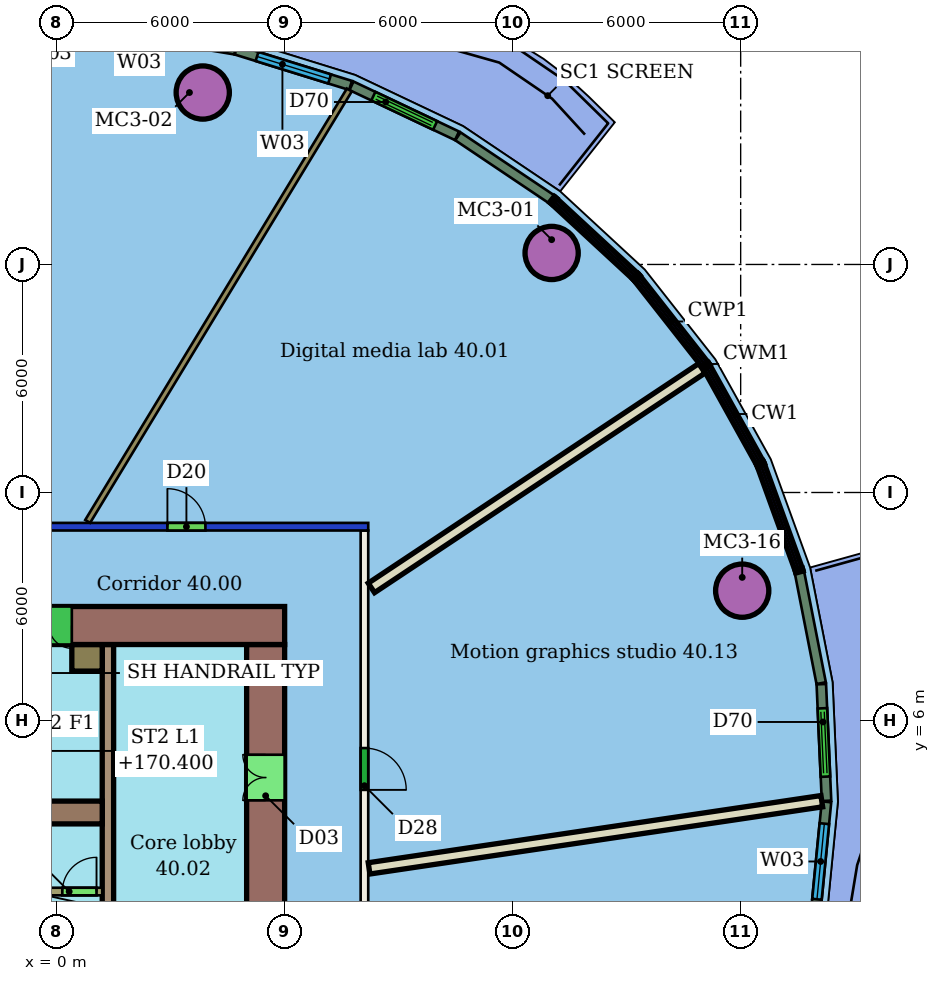
"""IFC4 building model, lengths in metres.
Left out: names, types, materials, properties, quantities, classifications, styles, units other than length and angle.
Written with IfcOpenShell. Run it as: python <this file> out.ifc"""

import sys

from ifc_helpers import new_model, si_unit, direction, frame, frame_2d, origin, origin_2d, place, context, subcontext, project, spatial, rectangle, hollow_circle, extrude, element, fill, save


model = new_model("IFC4")
c1 = context("Model", 3, precision=1e-05, world=origin(), true_north=direction((0.0, 1.0)))
c2 = subcontext(c1, "Body", "Model", "MODEL_VIEW")
j1 = project(units=[si_unit("LENGTHUNIT", "METRE"), si_unit("PLANEANGLEUNIT", "RADIAN")], contexts=[c1])
p1 = place(None, origin())
s1 = spatial("IfcSite", under=j1, at=p1, CompositionType="ELEMENT")
p2 = place(p1, origin())
s2 = spatial("IfcBuilding", under=s1, at=p2, CompositionType="ELEMENT")
p3 = place(p2, frame((0.0, 0.0, 168.6)))
s3 = spatial("IfcBuildingStorey", under=s2, at=p3, CompositionType="ELEMENT", Elevation=168.6)
for number, where, z_axis, x_axis in (
    (1, (13.026, 18.303, 0.0), (0.0, 0.0, 1.0), (1.0, 0.0, 0.0)),
    (2, (3.845, 22.524, 0.0), (0.0, 0.0, 1.0), (1.0, 0.0, 0.0)),
    (3, (18.041, 9.417, 0.0), (0.0, 0.0, 1.0), (1.0, 0.0, 0.0)),
):
    element("IfcColumn", number, at=place(p3, frame(where, z_axis=z_axis, x_axis=x_axis)), inside=s3, PredefinedType="COLUMN", context=c2, shape_type="SweptSolid", body=[
        extrude(hollow_circle(Radius=0.7, WallThickness=0.05, at=origin_2d()), origin(), (0.0, 0.0, 1.0), 3.45),
    ])
p4 = place(p3, frame((-20.2, 11.1, 0.0), z_axis=(0.0, 0.0, 1.0), x_axis=(1.0, 0.0, 0.0)))
e4 = element("IfcWall", 4, at=p4, inside=s3, PredefinedType="PARTITIONING", context=c2, shape_type="SweptSolid", body=[
    extrude(rectangle(XDim=28.4, YDim=0.2, at=frame_2d((14.2, 0.0))), origin(), (0.0, 0.0, 1.0), 3.05),
])
p5 = place(p4, frame((23.115, 0.0, 0.0)))
e5 = element("IfcOpeningElement", 5, at=p5, cuts=e4, PredefinedType="OPENING", context=c2, shape_type="SweptSolid", body=[
    extrude(rectangle(XDim=1.0, YDim=2.1, at=frame_2d((0.5, 1.05))), frame((0.0, 0.11, 0.0), z_axis=(0.0, -1.0, 0.0), x_axis=(1.0, 0.0, 0.0)), (0.0, 0.0, 1.0), 0.22),
])
p6 = place(p4, frame((16.0, 0.0, 0.0)))
e6 = element("IfcOpeningElement", 6, at=p6, cuts=e4, PredefinedType="OPENING", context=c2, shape_type="SweptSolid", body=[
    extrude(rectangle(XDim=1.8, YDim=2.1, at=frame_2d((0.9, 1.05))), frame((0.0, 0.11, 0.0), z_axis=(0.0, -1.0, 0.0), x_axis=(1.0, 0.0, 0.0)), (0.0, 0.0, 1.0), 0.22),
])
p7 = place(p4, frame((5.581, 0.0, 0.0)))
e7 = element("IfcOpeningElement", 7, at=p7, cuts=e4, PredefinedType="OPENING", context=c2, shape_type="SweptSolid", body=[
    extrude(rectangle(XDim=0.9, YDim=2.1, at=frame_2d((0.45, 1.05))), frame((0.0, 0.11, 0.0), z_axis=(0.0, -1.0, 0.0), x_axis=(1.0, 0.0, 0.0)), (0.0, 0.0, 1.0), 0.22),
])
p8 = place(p3, frame((8.1, 11.0, 0.0), z_axis=(0.0, 0.0, 1.0), x_axis=(0.0, -1.0, 0.0)))
e8 = element("IfcWall", 8, at=p8, inside=s3, PredefinedType="PARTITIONING", context=c2, shape_type="SweptSolid", body=[
    extrude(rectangle(XDim=22.0, YDim=0.2, at=frame_2d((11.0, 0.0))), origin(), (0.0, 0.0, 1.0), 3.45),
])
p9 = place(p8, frame((12.716, 0.0, 0.0)))
e9 = element("IfcOpeningElement", 9, at=p9, cuts=e8, PredefinedType="OPENING", context=c2, shape_type="SweptSolid", body=[
    extrude(rectangle(XDim=1.2, YDim=2.1, at=frame_2d((0.6, 1.05))), frame((0.0, 0.11, 0.0), z_axis=(0.0, -1.0, 0.0), x_axis=(1.0, 0.0, 0.0)), (0.0, 0.0, 1.0), 0.22),
])
p10 = place(p8, frame((5.725, 0.0, 0.0)))
e10 = element("IfcOpeningElement", 10, at=p10, cuts=e8, PredefinedType="OPENING", context=c2, shape_type="SweptSolid", body=[
    extrude(rectangle(XDim=1.1, YDim=2.1, at=frame_2d((0.55, 1.05))), frame((0.0, 0.11, 0.0), z_axis=(0.0, -1.0, 0.0), x_axis=(1.0, 0.0, 0.0)), (0.0, 0.0, 1.0), 0.22),
])
p11 = place(p3, frame((16.98, 15.268, 0.0), z_axis=(0.0, 0.0, 1.0), x_axis=(-0.832919781607, -0.553393745363, 0.0)))
e11 = element("IfcWall", 11, at=p11, inside=s3, PredefinedType="PARTITIONING", context=c2, shape_type="SweptSolid", body=[
    extrude(rectangle(XDim=10.442, YDim=0.3, at=frame_2d((5.221, 0.0))), origin(), (0.0, 0.0, 1.0), 3.45),
])
p12 = place(p3, frame((7.702, 22.59, 0.0), z_axis=(0.0, 0.0, 1.0), x_axis=(-0.518600423231, -0.855016725582, 0.0)))
e12 = element("IfcWall", 12, at=p12, inside=s3, PredefinedType="PARTITIONING", context=c2, shape_type="SweptSolid", body=[
    extrude(rectangle(XDim=13.276, YDim=0.15, at=frame_2d((6.638, 0.0))), origin(), (0.0, 0.0, 1.0), 3.45),
])
p13 = place(p3, frame((20.135, 3.877, 0.0), z_axis=(0.0, 0.0, 1.0), x_axis=(-0.989174164401, -0.146746286091, 0.0)))
e13 = element("IfcWall", 13, at=p13, inside=s3, PredefinedType="PARTITIONING", context=c2, shape_type="SweptSolid", body=[
    extrude(rectangle(XDim=12.043, YDim=0.3, at=frame_2d((6.022, 0.0))), origin(), (0.0, 0.0, 1.0), 3.45),
])
p14 = place(p3, frame((13.019, 19.719, 0.0), z_axis=(0.0, 0.0, 1.0), x_axis=(-0.830042449649, 0.557700216765, 0.0)))
e14 = element("IfcWall", 14, at=p14, inside=s3, PredefinedType="SOLIDWALL", context=c2, shape_type="SweptSolid", body=[
    extrude(rectangle(XDim=2.964, YDim=0.25, at=frame_2d((1.482, 0.0))), origin(), (0.0, 0.0, 1.0), 3.1),
])
p15 = place(p3, frame((10.536, 21.385, 0.0), z_axis=(0.0, 0.0, 1.0), x_axis=(-0.903619724227, 0.428335609058, 0.0)))
e15 = element("IfcWall", 15, at=p15, inside=s3, PredefinedType="SOLIDWALL", context=c2, shape_type="SweptSolid", body=[
    extrude(rectangle(XDim=3.073, YDim=0.25, at=frame_2d((1.537, 0.0))), origin(), (0.0, 0.0, 1.0), 3.1),
])
p16 = place(p15, frame((0.637, 0.0, 0.0)))
e16 = element("IfcOpeningElement", 16, at=p16, cuts=e15, PredefinedType="OPENING", context=c2, shape_type="SweptSolid", body=[
    extrude(rectangle(XDim=1.8, YDim=2.4, at=frame_2d((0.9, 1.2))), frame((0.0, 0.135, 0.0), z_axis=(0.0, -1.0, 0.0), x_axis=(1.0, 0.0, 0.0)), (0.0, 0.0, 1.0), 0.27),
])
p17 = place(p3, frame((7.735, 22.711, 0.0), z_axis=(0.0, 0.0, 1.0), x_axis=(-0.955252052872, 0.295793028119, 0.0)))
e17 = element("IfcWall", 17, at=p17, inside=s3, PredefinedType="SOLIDWALL", context=c2, shape_type="SweptSolid", body=[
    extrude(rectangle(XDim=3.155, YDim=0.25, at=frame_2d((1.577, 0.0))), origin(), (0.0, 0.0, 1.0), 3.1),
])
p18 = place(p17, frame((0.577, 0.0, 0.9)))
e18 = element("IfcOpeningElement", 18, at=p18, cuts=e17, PredefinedType="OPENING", context=c2, shape_type="SweptSolid", body=[
    extrude(rectangle(XDim=2.0, YDim=2.1, at=frame_2d((1.0, 1.05))), frame((0.0, 0.135, 0.0), z_axis=(0.0, -1.0, 0.0), x_axis=(1.0, 0.0, 0.0)), (0.0, 0.0, 1.0), 0.27),
])
p19 = place(p3, frame((4.697, 23.65, 0.0), z_axis=(0.0, 0.0, 1.0), x_axis=(-0.986414264197, 0.164276898525, 0.0)))
e19 = element("IfcWall", 19, at=p19, inside=s3, PredefinedType="SOLIDWALL", context=c2, shape_type="SweptSolid", body=[
    extrude(rectangle(XDim=3.243, YDim=0.25, at=frame_2d((1.621, 0.0))), origin(), (0.0, 0.0, 1.0), 3.1),
])
p20 = place(p19, frame((0.621, 0.0, 0.9)))
e20 = element("IfcOpeningElement", 20, at=p20, cuts=e19, PredefinedType="OPENING", context=c2, shape_type="SweptSolid", body=[
    extrude(rectangle(XDim=2.0, YDim=2.1, at=frame_2d((1.0, 1.05))), frame((0.0, 0.135, 0.0), z_axis=(0.0, -1.0, 0.0), x_axis=(1.0, 0.0, 0.0)), (0.0, 0.0, 1.0), 0.27),
])
p21 = place(p3, frame((19.951, 0.721, 0.0), z_axis=(0.0, 0.0, 1.0), x_axis=(0.097518814735, 0.99523368149, 0.0)))
e21 = element("IfcWall", 21, at=p21, inside=s3, PredefinedType="SOLIDWALL", context=c2, shape_type="SweptSolid", body=[
    extrude(rectangle(XDim=3.155, YDim=0.25, at=frame_2d((1.577, 0.0))), origin(), (0.0, 0.0, 1.0), 3.1),
])
p22 = place(p21, frame((0.577, 0.0, 0.9)))
e22 = element("IfcOpeningElement", 22, at=p22, cuts=e21, PredefinedType="OPENING", context=c2, shape_type="SweptSolid", body=[
    extrude(rectangle(XDim=2.0, YDim=2.1, at=frame_2d((1.0, 1.05))), frame((0.0, 0.135, 0.0), z_axis=(0.0, -1.0, 0.0), x_axis=(1.0, 0.0, 0.0)), (0.0, 0.0, 1.0), 0.27),
])
p23 = place(p3, frame((20.259, 3.887, 0.0), z_axis=(0.0, 0.0, 1.0), x_axis=(-0.044643739649, 0.999002971222, 0.0)))
e23 = element("IfcWall", 23, at=p23, inside=s3, PredefinedType="SOLIDWALL", context=c2, shape_type="SweptSolid", body=[
    extrude(rectangle(XDim=3.073, YDim=0.25, at=frame_2d((1.537, 0.0))), origin(), (0.0, 0.0, 1.0), 3.1),
])
p24 = place(p23, frame((0.637, 0.0, 0.0)))
e24 = element("IfcOpeningElement", 24, at=p24, cuts=e23, PredefinedType="OPENING", context=c2, shape_type="SweptSolid", body=[
    extrude(rectangle(XDim=1.8, YDim=2.4, at=frame_2d((0.9, 1.2))), frame((0.0, 0.135, 0.0), z_axis=(0.0, -1.0, 0.0), x_axis=(1.0, 0.0, 0.0)), (0.0, 0.0, 1.0), 0.27),
])
p25 = place(p3, frame((20.119, 6.983, 0.0), z_axis=(0.0, 0.0, 1.0), x_axis=(-0.192503114172, 0.981296362489, 0.0)))
e25 = element("IfcWall", 25, at=p25, inside=s3, PredefinedType="SOLIDWALL", context=c2, shape_type="SweptSolid", body=[
    extrude(rectangle(XDim=2.964, YDim=0.25, at=frame_2d((1.482, 0.0))), origin(), (0.0, 0.0, 1.0), 3.1),
])
p26 = place(p3, frame((6.0, 8.5, 0.0), z_axis=(0.0, 0.0, 1.0), x_axis=(-1.0, 0.0, 0.0)))
e26 = element("IfcWall", 26, at=p26, inside=s3, PredefinedType="SHEAR", context=c2, shape_type="SweptSolid", body=[
    extrude(rectangle(XDim=12.0, YDim=1.0, at=frame_2d((6.0, 0.0))), origin(), (0.0, 0.0, 1.0), 3.3),
])
p27 = place(p26, frame((5.6, 0.0, 0.0)))
e27 = element("IfcOpeningElement", 27, at=p27, cuts=e26, PredefinedType="OPENING", context=c2, shape_type="SweptSolid", body=[
    extrude(rectangle(XDim=1.2, YDim=2.1, at=frame_2d((0.6, 1.05))), frame((0.0, 0.51, 0.0), z_axis=(0.0, -1.0, 0.0), x_axis=(1.0, 0.0, 0.0)), (0.0, 0.0, 1.0), 1.02),
])
p28 = place(p3, frame((5.5, -8.0, 0.0), z_axis=(0.0, 0.0, 1.0), x_axis=(0.0, 1.0, 0.0)))
e28 = element("IfcWall", 28, at=p28, inside=s3, PredefinedType="SHEAR", context=c2, shape_type="SweptSolid", body=[
    extrude(rectangle(XDim=16.0, YDim=1.0, at=frame_2d((8.0, 0.0))), origin(), (0.0, 0.0, 1.0), 3.3),
])
p29 = place(p28, frame((2.9, 0.0, 0.0)))
e29 = element("IfcOpeningElement", 29, at=p29, cuts=e28, PredefinedType="OPENING", context=c2, shape_type="SweptSolid", body=[
    extrude(rectangle(XDim=1.2, YDim=2.1, at=frame_2d((0.6, 1.05))), frame((0.0, 0.51, 0.0), z_axis=(0.0, -1.0, 0.0), x_axis=(1.0, 0.0, 0.0)), (0.0, 0.0, 1.0), 1.02),
])
p30 = place(p28, frame((11.9, 0.0, 0.0)))
e30 = element("IfcOpeningElement", 30, at=p30, cuts=e28, PredefinedType="OPENING", context=c2, shape_type="SweptSolid", body=[
    extrude(rectangle(XDim=1.2, YDim=2.1, at=frame_2d((0.6, 1.05))), frame((0.0, 0.51, 0.0), z_axis=(0.0, -1.0, 0.0), x_axis=(1.0, 0.0, 0.0)), (0.0, 0.0, 1.0), 1.02),
])
p31 = place(p3, frame((-6.0, 3.58, 0.0), z_axis=(0.0, 0.0, 1.0), x_axis=(1.0, 0.0, 0.0)))
e31 = element("IfcWall", 31, at=p31, inside=s3, PredefinedType="SHEAR", context=c2, shape_type="SweptSolid", body=[
    extrude(rectangle(XDim=7.2, YDim=0.6, at=frame_2d((3.6, 0.0))), origin(), (0.0, 0.0, 1.0), 3.3),
])
p32 = place(p3, frame((1.35, -8.0, 0.0), z_axis=(0.0, 0.0, 1.0), x_axis=(0.0, 1.0, 0.0)))
e32 = element("IfcWall", 32, at=p32, inside=s3, PredefinedType="SHEAR", context=c2, shape_type="SweptSolid", body=[
    extrude(rectangle(XDim=16.0, YDim=0.3, at=frame_2d((8.0, 0.0))), origin(), (0.0, 0.0, 1.0), 3.3),
])
p33 = place(p32, frame((1.91, 0.0, 0.0)))
e33 = element("IfcOpeningElement", 33, at=p33, cuts=e32, PredefinedType="OPENING", context=c2, shape_type="SweptSolid", body=[
    extrude(rectangle(XDim=1.0, YDim=2.1, at=frame_2d((0.5, 1.05))), frame((0.0, 0.16, 0.0), z_axis=(0.0, -1.0, 0.0), x_axis=(1.0, 0.0, 0.0)), (0.0, 0.0, 1.0), 0.32),
])
p34 = place(p32, frame((7.25, 0.0, 0.0)))
e34 = element("IfcOpeningElement", 34, at=p34, cuts=e32, PredefinedType="OPENING", context=c2, shape_type="SweptSolid", body=[
    extrude(rectangle(XDim=1.5, YDim=2.1, at=frame_2d((0.75, 1.05))), frame((0.0, 0.16, 0.0), z_axis=(0.0, -1.0, 0.0), x_axis=(1.0, 0.0, 0.0)), (0.0, 0.0, 1.0), 0.32),
])
p35 = place(p3, frame((-13.2, 1.5, 0.0), z_axis=(0.0, 0.0, 1.0), x_axis=(1.0, 0.0, 0.0)))
e35 = element("IfcWall", 35, at=p35, inside=s3, PredefinedType="SHEAR", context=c2, shape_type="SweptSolid", body=[
    extrude(rectangle(XDim=14.4, YDim=0.2, at=frame_2d((7.2, 0.0))), origin(), (0.0, 0.0, 1.0), 3.3),
])
p36 = place(p35, frame((0.546, 0.0, 0.0)))
e36 = element("IfcOpeningElement", 36, at=p36, cuts=e35, PredefinedType="OPENING", context=c2, shape_type="SweptSolid", body=[
    extrude(rectangle(XDim=1.1, YDim=2.1, at=frame_2d((0.55, 1.05))), frame((0.0, 0.11, 0.0), z_axis=(0.0, -1.0, 0.0), x_axis=(1.0, 0.0, 0.0)), (0.0, 0.0, 1.0), 0.22),
])
p37 = place(p35, frame((2.988, 0.0, 0.0)))
e37 = element("IfcOpeningElement", 37, at=p37, cuts=e35, PredefinedType="OPENING", context=c2, shape_type="SweptSolid", body=[
    extrude(rectangle(XDim=1.1, YDim=2.1, at=frame_2d((0.55, 1.05))), frame((0.0, 0.11, 0.0), z_axis=(0.0, -1.0, 0.0), x_axis=(1.0, 0.0, 0.0)), (0.0, 0.0, 1.0), 0.22),
])
p38 = place(p35, frame((5.429, 0.0, 0.0)))
e38 = element("IfcOpeningElement", 38, at=p38, cuts=e35, PredefinedType="OPENING", context=c2, shape_type="SweptSolid", body=[
    extrude(rectangle(XDim=1.1, YDim=2.1, at=frame_2d((0.55, 1.05))), frame((0.0, 0.11, 0.0), z_axis=(0.0, -1.0, 0.0), x_axis=(1.0, 0.0, 0.0)), (0.0, 0.0, 1.0), 0.22),
])
p39 = place(p35, frame((7.871, 0.0, 0.0)))
e39 = element("IfcOpeningElement", 39, at=p39, cuts=e35, PredefinedType="OPENING", context=c2, shape_type="SweptSolid", body=[
    extrude(rectangle(XDim=1.1, YDim=2.1, at=frame_2d((0.55, 1.05))), frame((0.0, 0.11, 0.0), z_axis=(0.0, -1.0, 0.0), x_axis=(1.0, 0.0, 0.0)), (0.0, 0.0, 1.0), 0.22),
])
p40 = place(p35, frame((13.35, 0.0, 0.0)))
e40 = element("IfcOpeningElement", 40, at=p40, cuts=e35, PredefinedType="OPENING", context=c2, shape_type="SweptSolid", body=[
    extrude(rectangle(XDim=0.9, YDim=2.1, at=frame_2d((0.45, 1.05))), frame((0.0, 0.11, 0.0), z_axis=(0.0, -1.0, 0.0), x_axis=(1.0, 0.0, 0.0)), (0.0, 0.0, 1.0), 0.22),
])
p41 = place(p3, frame((0.4, 7.65, 0.0), z_axis=(0.0, 0.0, 1.0), x_axis=(1.0, 0.0, 0.0)))
e41 = element("IfcWall", 41, at=p41, inside=s3, PredefinedType="SHEAR", context=c2, shape_type="SweptSolid", body=[
    extrude(rectangle(XDim=0.8, YDim=0.7, at=frame_2d((0.4, 0.0))), origin(), (0.0, 0.0, 1.0), 3.3),
])
p42 = place(p5, origin())
e42 = element("IfcDoor", 42, at=p42, inside=s3, OperationType="SINGLE_SWING_LEFT", PredefinedType="DOOR", context=c2, shape_type="SweptSolid", body=[
    extrude(rectangle(XDim=1.0, YDim=2.1, at=frame_2d((0.5, 1.05))), frame((0.0, 0.025, 0.0), z_axis=(0.0, -1.0, 0.0), x_axis=(1.0, 0.0, 0.0)), (0.0, 0.0, 1.0), 0.05),
])
fill(e5, e42)
p43 = place(p10, origin())
e43 = element("IfcDoor", 43, at=p43, inside=s3, OperationType="SINGLE_SWING_RIGHT", PredefinedType="DOOR", context=c2, shape_type="SweptSolid", body=[
    extrude(rectangle(XDim=1.1, YDim=2.1, at=frame_2d((0.55, 1.05))), frame((0.0, 0.025, 0.0), z_axis=(0.0, -1.0, 0.0), x_axis=(1.0, 0.0, 0.0)), (0.0, 0.0, 1.0), 0.05),
])
fill(e10, e43)
p44 = place(p16, origin())
e44 = element("IfcDoor", 44, at=p44, inside=s3, OperationType="DOUBLE_DOOR_SLIDING", PredefinedType="DOOR", context=c2, shape_type="SweptSolid", body=[
    extrude(rectangle(XDim=1.8, YDim=2.4, at=frame_2d((0.9, 1.2))), frame((0.0, 0.025, 0.0), z_axis=(0.0, -1.0, 0.0), x_axis=(1.0, 0.0, 0.0)), (0.0, 0.0, 1.0), 0.05),
])
fill(e16, e44)
p45 = place(p18, origin())
e45 = element("IfcWindow", 45, at=p45, inside=s3, PartitioningType="SINGLE_PANEL", PredefinedType="WINDOW", context=c2, shape_type="SweptSolid", body=[
    extrude(rectangle(XDim=2.0, YDim=2.1, at=frame_2d((1.0, 1.05))), frame((0.0, 0.03, 0.0), z_axis=(0.0, -1.0, 0.0), x_axis=(1.0, 0.0, 0.0)), (0.0, 0.0, 1.0), 0.06),
])
fill(e18, e45)
p46 = place(p22, origin())
e46 = element("IfcWindow", 46, at=p46, inside=s3, PartitioningType="SINGLE_PANEL", PredefinedType="WINDOW", context=c2, shape_type="SweptSolid", body=[
    extrude(rectangle(XDim=2.0, YDim=2.1, at=frame_2d((1.0, 1.05))), frame((0.0, 0.03, 0.0), z_axis=(0.0, -1.0, 0.0), x_axis=(1.0, 0.0, 0.0)), (0.0, 0.0, 1.0), 0.06),
])
fill(e22, e46)
p47 = place(p24, origin())
e47 = element("IfcDoor", 47, at=p47, inside=s3, OperationType="DOUBLE_DOOR_SLIDING", PredefinedType="DOOR", context=c2, shape_type="SweptSolid", body=[
    extrude(rectangle(XDim=1.8, YDim=2.4, at=frame_2d((0.9, 1.2))), frame((0.0, 0.025, 0.0), z_axis=(0.0, -1.0, 0.0), x_axis=(1.0, 0.0, 0.0)), (0.0, 0.0, 1.0), 0.05),
])
fill(e24, e47)
p48 = place(p27, origin())
e48 = element("IfcDoor", 48, at=p48, inside=s3, OperationType="DOUBLE_DOOR_SINGLE_SWING", PredefinedType="NOTDEFINED", context=c2, shape_type="SweptSolid", body=[
    extrude(rectangle(XDim=1.2, YDim=2.1, at=frame_2d((0.6, 1.05))), frame((0.0, 0.025, 0.0), z_axis=(0.0, -1.0, 0.0), x_axis=(1.0, 0.0, 0.0)), (0.0, 0.0, 1.0), 0.05),
])
fill(e27, e48)
p49 = place(p30, origin())
e49 = element("IfcDoor", 49, at=p49, inside=s3, OperationType="DOUBLE_DOOR_SINGLE_SWING", PredefinedType="NOTDEFINED", context=c2, shape_type="SweptSolid", body=[
    extrude(rectangle(XDim=1.2, YDim=2.1, at=frame_2d((0.6, 1.05))), frame((0.0, 0.025, 0.0), z_axis=(0.0, -1.0, 0.0), x_axis=(1.0, 0.0, 0.0)), (0.0, 0.0, 1.0), 0.05),
])
fill(e30, e49)
p50 = place(p40, origin())
e50 = element("IfcDoor", 50, at=p50, inside=s3, OperationType="SINGLE_SWING_RIGHT", PredefinedType="NOTDEFINED", context=c2, shape_type="SweptSolid", body=[
    extrude(rectangle(XDim=0.9, YDim=2.1, at=frame_2d((0.45, 1.05))), frame((0.0, 0.025, 0.0), z_axis=(0.0, -1.0, 0.0), x_axis=(1.0, 0.0, 0.0)), (0.0, 0.0, 1.0), 0.05),
])
fill(e40, e50)
save(model, sys.argv[1])
